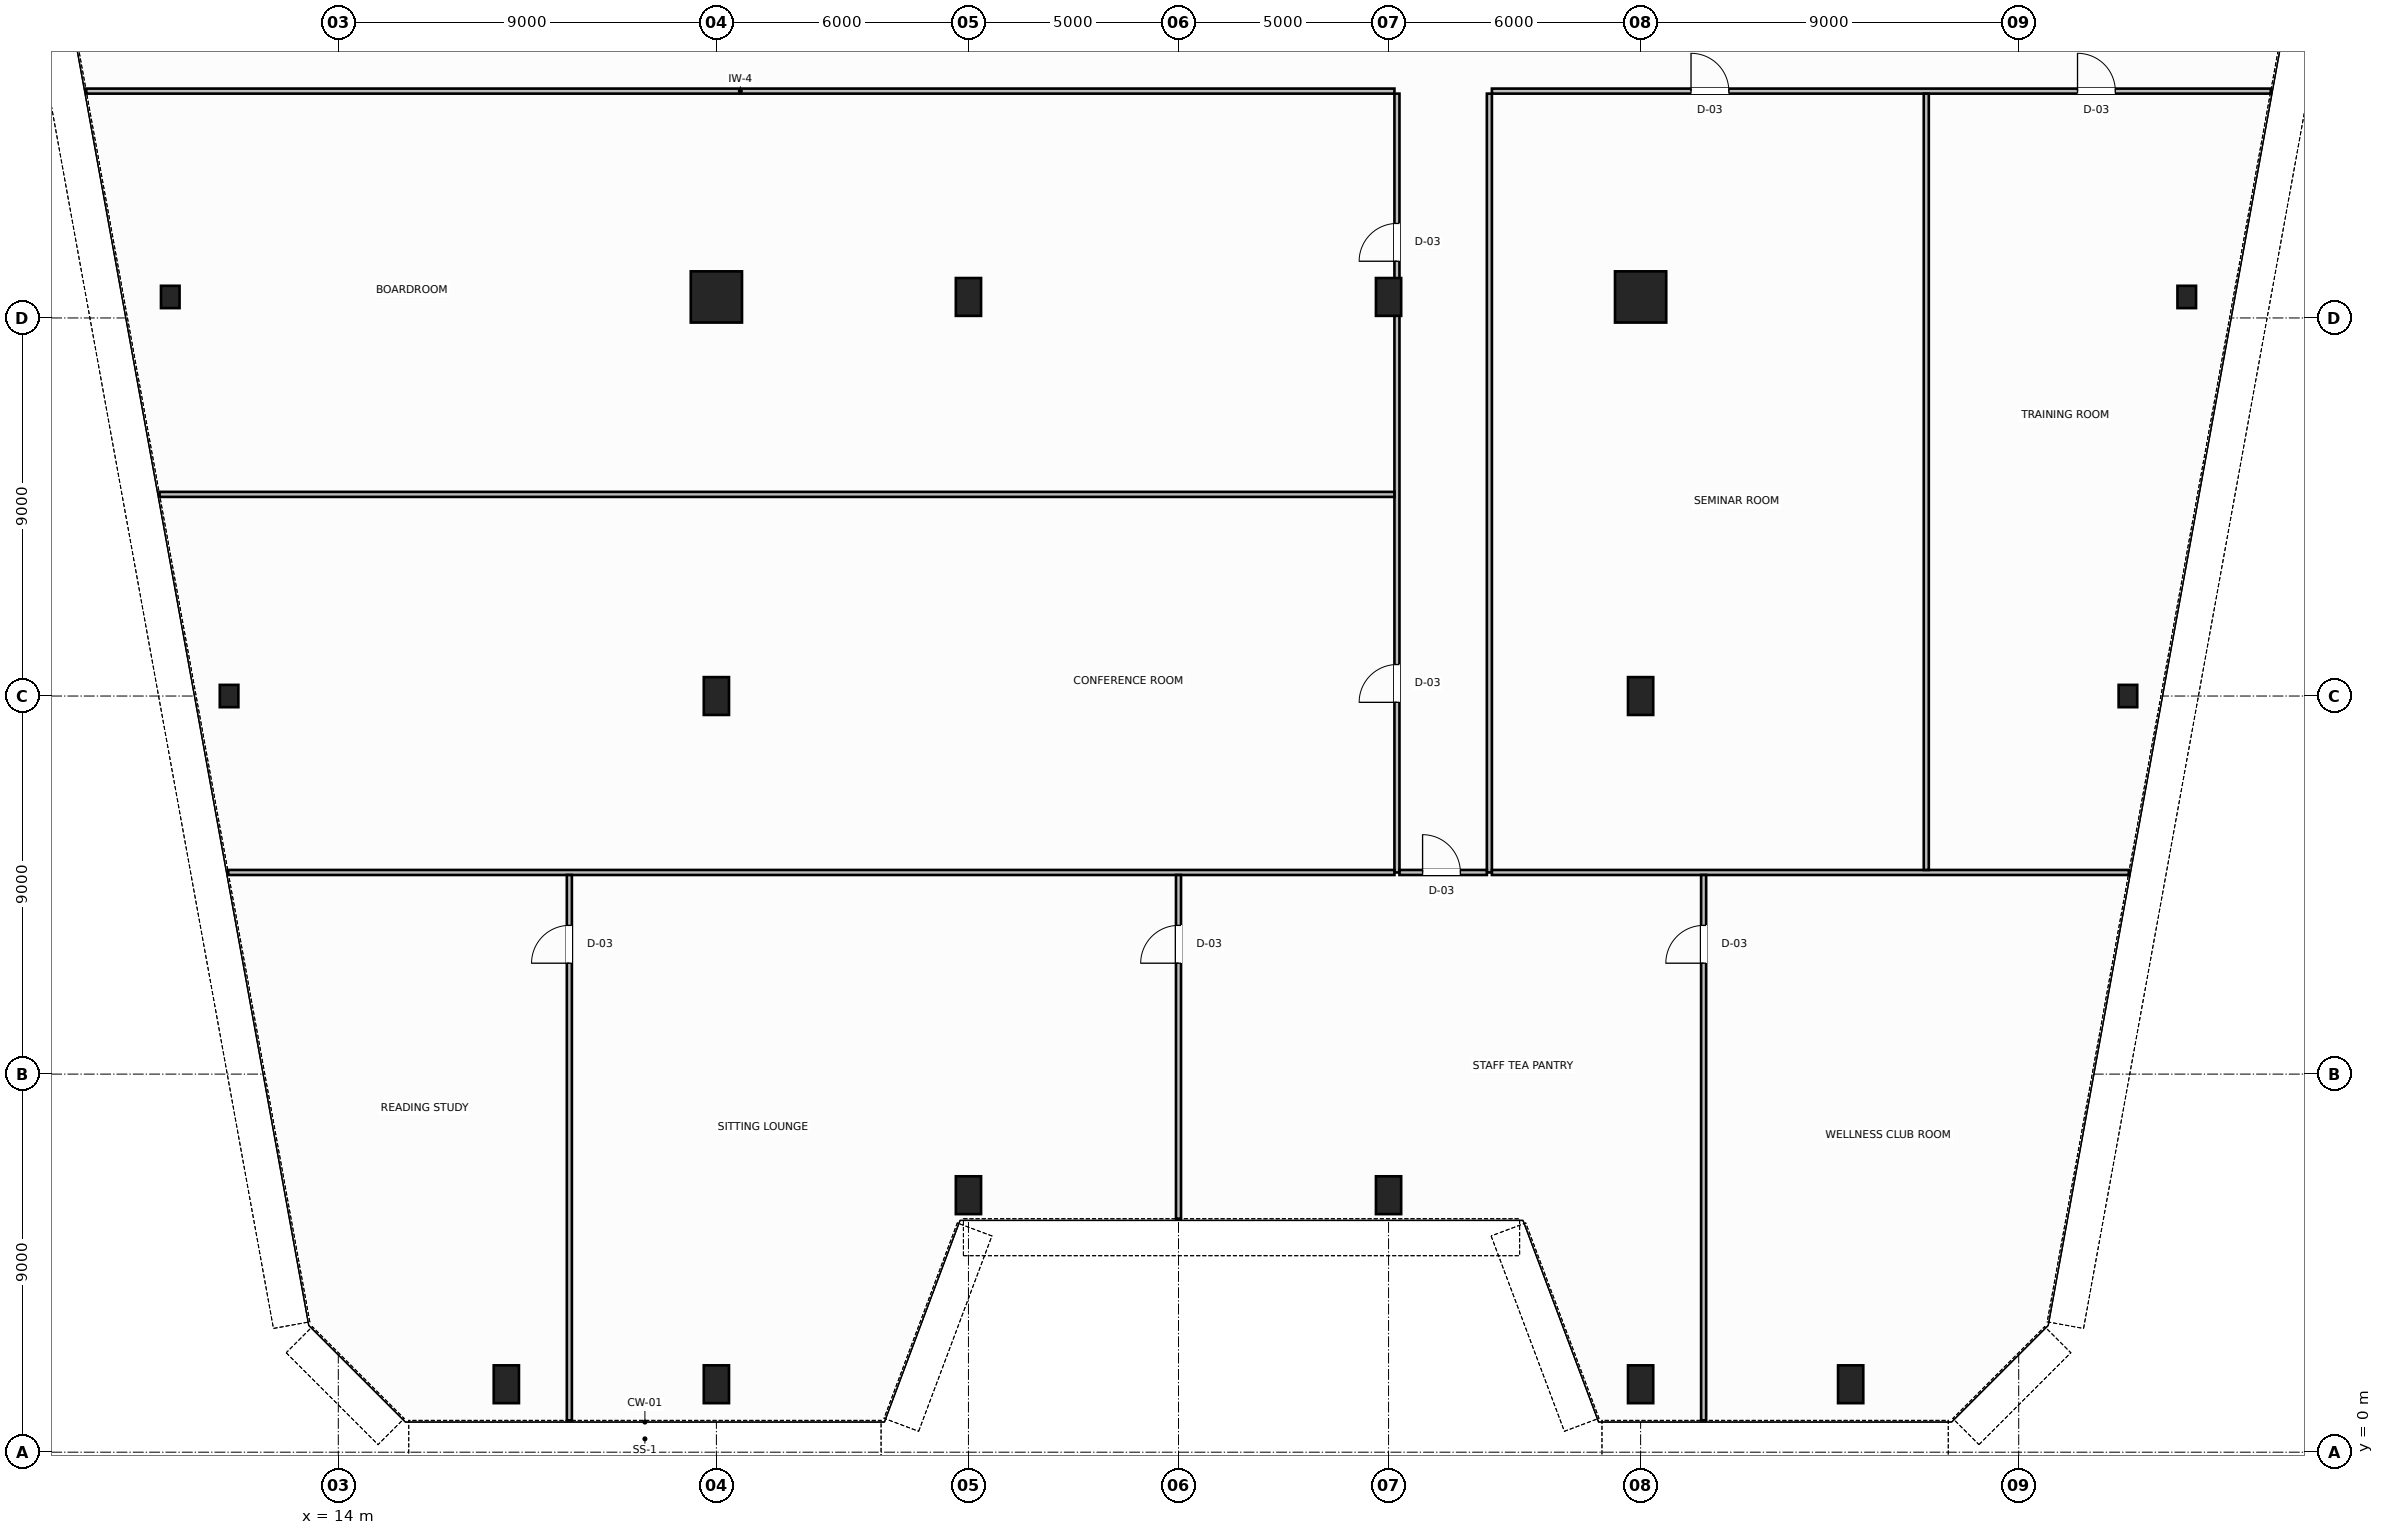
"""IFC4 building model, lengths in metres.
Left out: names, types, materials, properties, quantities, classifications, styles, units other than length and angle.
Written with IfcOpenShell. Run it as: python <this file> out.ifc"""

import sys

from ifc_helpers import new_model, si_unit, direction, frame, frame_2d, origin, origin_2d, place, context, subcontext, project, spatial, rectangle, hollow_rectangle, hollow_circle, i_section, extrude, source, transform, mapped, element, fill, save


model = new_model("IFC4")
c1 = context("Model", 3, precision=1e-05, world=origin(), true_north=direction((0.0, 1.0)))
c2 = subcontext(c1, "Body", "Model", "MODEL_VIEW")
j1 = project(units=[si_unit("LENGTHUNIT", "METRE"), si_unit("PLANEANGLEUNIT", "RADIAN")], contexts=[c1])
p1 = place(None, origin())
s1 = spatial("IfcSite", under=j1, at=p1, CompositionType="ELEMENT")
p2 = place(p1, origin())
s2 = spatial("IfcBuilding", under=s1, at=p2, CompositionType="ELEMENT")
p3 = place(p2, frame((0.0, 0.0, 30.2)))
s3 = spatial("IfcBuildingStorey", under=s2, at=p3, CompositionType="ELEMENT", Elevation=30.2)
m1 = source(origin(), c2, "Body", "SweptSolid", [
    extrude(i_section(OverallWidth=0.442, OverallDepth=0.531, WebThickness=0.065, FlangeThickness=0.076, FilletRadius=0.015, at=origin_2d()), origin(), (0.0, 0.0, 1.0), 3.8),
])
for number, where, z_axis, x_axis in (
    (1, (10.0, 27.5, 0.0), (0.0, 0.0, 1.0), (1.0, 0.0, 0.0)),
    (2, (11.4, 18.0, 0.0), (0.0, 0.0, 1.0), (1.0, 0.0, 0.0)),
    (3, (58.0, 27.5, 0.0), (0.0, 0.0, 1.0), (1.0, 0.0, 0.0)),
    (4, (56.6, 18.0, 0.0), (0.0, 0.0, 1.0), (1.0, 0.0, 0.0)),
):
    element("IfcColumn", number, at=place(p3, frame(where, z_axis=z_axis, x_axis=x_axis)), inside=s3, PredefinedType="COLUMN", context=c2, shape_type="MappedRepresentation", body=[
        mapped(m1, transform((0.0, 0.0, 0.0), scale=1.0)),
    ])
m2 = source(origin(), c2, "Body", "SweptSolid", [
    extrude(hollow_circle(Radius=0.61, WallThickness=0.05, at=origin_2d()), origin(), (0.0, 0.0, 1.0), 3.8),
])
p4 = place(p3, frame((23.0, 27.5, 0.0), z_axis=(0.0, 0.0, 1.0), x_axis=(1.0, 0.0, 0.0)))
e5 = element("IfcColumn", 5, at=p4, inside=s3, PredefinedType="COLUMN", context=c2, shape_type="MappedRepresentation", body=[
    mapped(m2, transform((0.0, 0.0, 0.0), scale=1.0)),
])
m3 = source(origin(), c2, "Body", "SweptSolid", [
    extrude(hollow_rectangle(XDim=0.6, YDim=0.9, WallThickness=0.04, InnerFilletRadius=0.04, OuterFilletRadius=0.08, at=origin_2d()), origin(), (0.0, 0.0, 1.0), 3.8),
])
for number, where, z_axis, x_axis in (
    (6, (29.0, 27.5, 0.0), (0.0, 0.0, 1.0), (1.0, 0.0, 0.0)),
    (7, (39.0, 27.5, 0.0), (0.0, 0.0, 1.0), (1.0, 0.0, 0.0)),
):
    element("IfcColumn", number, at=place(p3, frame(where, z_axis=z_axis, x_axis=x_axis)), inside=s3, PredefinedType="COLUMN", context=c2, shape_type="MappedRepresentation", body=[
        mapped(m3, transform((0.0, 0.0, 0.0), scale=1.0)),
    ])
p5 = place(p3, frame((45.0, 27.5, 0.0), z_axis=(0.0, 0.0, 1.0), x_axis=(1.0, 0.0, 0.0)))
e8 = element("IfcColumn", 8, at=p5, inside=s3, PredefinedType="COLUMN", context=c2, shape_type="MappedRepresentation", body=[
    mapped(m2, transform((0.0, 0.0, 0.0), scale=1.0)),
])
for number, where, z_axis, x_axis in (
    (9, (23.0, 18.0, 0.0), (0.0, 0.0, 1.0), (1.0, 0.0, 0.0)),
    (10, (45.0, 18.0, 0.0), (0.0, 0.0, 1.0), (1.0, 0.0, 0.0)),
):
    element("IfcColumn", number, at=place(p3, frame(where, z_axis=z_axis, x_axis=x_axis)), inside=s3, PredefinedType="COLUMN", context=c2, shape_type="MappedRepresentation", body=[
        mapped(m3, transform((0.0, 0.0, 0.0), scale=1.0)),
    ])
m4 = source(origin(), c2, "Body", "SweptSolid", [
    extrude(hollow_rectangle(XDim=0.6, YDim=0.9, WallThickness=0.04, InnerFilletRadius=0.04, OuterFilletRadius=0.08, at=origin_2d()), origin(), (0.0, 0.0, 1.0), 3.744),
])
for number, where, z_axis, x_axis in (
    (11, (18.0, 1.617, 0.032), (0.0, 0.064, 0.998), (-1.0, 0.0, 0.0)),
    (12, (23.0, 1.617, 0.032), (0.0, 0.064, 0.998), (-1.0, 0.0, 0.0)),
    (13, (29.0, 6.117, 0.032), (0.0, 0.064, 0.998), (-1.0, 0.0, 0.0)),
    (14, (39.0, 6.117, 0.032), (0.0, 0.064, 0.998), (-1.0, 0.0, 0.0)),
    (15, (45.0, 1.617, 0.032), (0.0, 0.064, 0.998), (-1.0, 0.0, 0.0)),
    (16, (50.0, 1.617, 0.032), (0.0, 0.064, 0.998), (-1.0, 0.0, 0.0)),
):
    element("IfcColumn", number, at=place(p3, frame(where, z_axis=z_axis, x_axis=x_axis)), inside=s3, PredefinedType="COLUMN", context=c2, shape_type="MappedRepresentation", body=[
        mapped(m4, transform((0.0, 0.0, 0.0), scale=1.0)),
    ])
p6 = place(p3, frame((8.0, 32.4, 0.0), z_axis=(0.0, 0.0, 1.0), x_axis=(1.0, 0.0, 0.0)))
e17 = element("IfcWall", 17, at=p6, inside=s3, PredefinedType="PARTITIONING", context=c2, shape_type="SweptSolid", body=[
    extrude(rectangle(XDim=31.14, YDim=0.12, at=frame_2d((15.57, 0.0))), origin(), (0.0, 0.0, 1.0), 3.58),
])
p7 = place(p3, frame((41.46, 32.4, 0.0), z_axis=(0.0, 0.0, 1.0), x_axis=(1.0, 0.0, 0.0)))
e18 = element("IfcWall", 18, at=p7, inside=s3, PredefinedType="PARTITIONING", context=c2, shape_type="SweptSolid", body=[
    extrude(rectangle(XDim=18.54, YDim=0.12, at=frame_2d((9.27, 0.0))), origin(), (0.0, 0.0, 1.0), 3.58),
])
p8 = place(p7, frame((4.74, 0.0, 0.0)))
e19 = element("IfcOpeningElement", 19, at=p8, cuts=e18, PredefinedType="OPENING", context=c2, shape_type="SweptSolid", body=[
    extrude(rectangle(XDim=0.9, YDim=2.15, at=frame_2d((0.45, 1.075))), frame((0.0, 0.07, 0.0), z_axis=(0.0, -1.0, 0.0), x_axis=(1.0, 0.0, 0.0)), (0.0, 0.0, 1.0), 0.14),
])
p9 = place(p7, frame((13.94, 0.0, 0.0)))
e20 = element("IfcOpeningElement", 20, at=p9, cuts=e18, PredefinedType="OPENING", context=c2, shape_type="SweptSolid", body=[
    extrude(rectangle(XDim=0.9, YDim=2.15, at=frame_2d((0.45, 1.075))), frame((0.0, 0.07, 0.0), z_axis=(0.0, -1.0, 0.0), x_axis=(1.0, 0.0, 0.0)), (0.0, 0.0, 1.0), 0.14),
])
p10 = place(p3, frame((39.2, 13.8, 0.0), z_axis=(0.0, 0.0, 1.0), x_axis=(0.0, 1.0, 0.0)))
e21 = element("IfcWall", 21, at=p10, inside=s3, PredefinedType="PARTITIONING", context=c2, shape_type="SweptSolid", body=[
    extrude(rectangle(XDim=18.54, YDim=0.12, at=frame_2d((9.27, 0.0))), origin(), (0.0, 0.0, 1.0), 2.77),
])
p11 = place(p10, frame((4.05, 0.0, 0.0)))
e22 = element("IfcOpeningElement", 22, at=p11, cuts=e21, PredefinedType="OPENING", context=c2, shape_type="SweptSolid", body=[
    extrude(rectangle(XDim=0.9, YDim=2.15, at=frame_2d((0.45, 1.075))), frame((0.0, 0.07, 0.0), z_axis=(0.0, -1.0, 0.0), x_axis=(1.0, 0.0, 0.0)), (0.0, 0.0, 1.0), 0.14),
])
p12 = place(p10, frame((14.55, 0.0, 0.0)))
e23 = element("IfcOpeningElement", 23, at=p12, cuts=e21, PredefinedType="OPENING", context=c2, shape_type="SweptSolid", body=[
    extrude(rectangle(XDim=0.9, YDim=2.15, at=frame_2d((0.45, 1.075))), frame((0.0, 0.07, 0.0), z_axis=(0.0, -1.0, 0.0), x_axis=(1.0, 0.0, 0.0)), (0.0, 0.0, 1.0), 0.14),
])
p13 = place(p3, frame((41.4, 13.8, 0.0), z_axis=(0.0, 0.0, 1.0), x_axis=(0.0, 1.0, 0.0)))
e24 = element("IfcWall", 24, at=p13, inside=s3, PredefinedType="PARTITIONING", context=c2, shape_type="SweptSolid", body=[
    extrude(rectangle(XDim=18.54, YDim=0.12, at=frame_2d((9.27, 0.0))), origin(), (0.0, 0.0, 1.0), 3.58),
])
p14 = place(p3, frame((39.26, 13.8, 0.0), z_axis=(0.0, 0.0, 1.0), x_axis=(1.0, 0.0, 0.0)))
e25 = element("IfcWall", 25, at=p14, inside=s3, PredefinedType="PARTITIONING", context=c2, shape_type="SweptSolid", body=[
    extrude(rectangle(XDim=2.08, YDim=0.12, at=frame_2d((1.04, 0.0))), origin(), (0.0, 0.0, 1.0), 3.58),
])
p15 = place(p14, frame((0.55, 0.0, 0.0)))
e26 = element("IfcOpeningElement", 26, at=p15, cuts=e25, PredefinedType="OPENING", context=c2, shape_type="SweptSolid", body=[
    extrude(rectangle(XDim=0.9, YDim=2.15, at=frame_2d((0.45, 1.075))), frame((0.0, 0.07, 0.0), z_axis=(0.0, -1.0, 0.0), x_axis=(1.0, 0.0, 0.0)), (0.0, 0.0, 1.0), 0.14),
])
p16 = place(p3, frame((11.378, 13.8, 0.0), z_axis=(0.0, 0.0, 1.0), x_axis=(1.0, 0.0, 0.0)))
e27 = element("IfcWall", 27, at=p16, inside=s3, PredefinedType="PARTITIONING", context=c2, shape_type="SweptSolid", body=[
    extrude(rectangle(XDim=27.761, YDim=0.12, at=frame_2d((13.881, 0.0))), origin(), (0.0, 0.0, 1.0), 3.58),
])
p17 = place(p3, frame((41.46, 13.8, 0.0), z_axis=(0.0, 0.0, 1.0), x_axis=(1.0, 0.0, 0.0)))
e28 = element("IfcWall", 28, at=p17, inside=s3, PredefinedType="PARTITIONING", context=c2, shape_type="SweptSolid", body=[
    extrude(rectangle(XDim=15.162, YDim=0.12, at=frame_2d((7.581, 0.0))), origin(), (0.0, 0.0, 1.0), 3.58),
])
p18 = place(p3, frame((19.5, 0.757, 0.0), z_axis=(0.0, 0.0, 1.0), x_axis=(0.0, 1.0, 0.0)))
e29 = element("IfcWall", 29, at=p18, inside=s3, PredefinedType="PARTITIONING", context=c2, shape_type="SweptSolid", body=[
    extrude(rectangle(XDim=12.983, YDim=0.12, at=frame_2d((6.491, 0.0))), origin(), (0.0, 0.0, 1.0), 3.58),
])
p19 = place(p18, frame((10.883, 0.0, 0.0)))
e30 = element("IfcOpeningElement", 30, at=p19, cuts=e29, PredefinedType="OPENING", context=c2, shape_type="SweptSolid", body=[
    extrude(rectangle(XDim=0.9, YDim=2.15, at=frame_2d((0.45, 1.075))), frame((0.0, 0.07, 0.0), z_axis=(0.0, -1.0, 0.0), x_axis=(1.0, 0.0, 0.0)), (0.0, 0.0, 1.0), 0.14),
])
p20 = place(p3, frame((34.0, 5.557, 0.0), z_axis=(0.0, 0.0, 1.0), x_axis=(0.0, 1.0, 0.0)))
e31 = element("IfcWall", 31, at=p20, inside=s3, PredefinedType="PARTITIONING", context=c2, shape_type="SweptSolid", body=[
    extrude(rectangle(XDim=8.183, YDim=0.12, at=frame_2d((4.091, 0.0))), origin(), (0.0, 0.0, 1.0), 3.58),
])
p21 = place(p20, frame((6.083, 0.0, 0.0)))
e32 = element("IfcOpeningElement", 32, at=p21, cuts=e31, PredefinedType="OPENING", context=c2, shape_type="SweptSolid", body=[
    extrude(rectangle(XDim=0.9, YDim=2.15, at=frame_2d((0.45, 1.075))), frame((0.0, 0.07, 0.0), z_axis=(0.0, -1.0, 0.0), x_axis=(1.0, 0.0, 0.0)), (0.0, 0.0, 1.0), 0.14),
])
p22 = place(p3, frame((46.5, 0.757, 0.0), z_axis=(0.0, 0.0, 1.0), x_axis=(0.0, 1.0, 0.0)))
e33 = element("IfcWall", 33, at=p22, inside=s3, PredefinedType="PARTITIONING", context=c2, shape_type="SweptSolid", body=[
    extrude(rectangle(XDim=12.983, YDim=0.12, at=frame_2d((6.491, 0.0))), origin(), (0.0, 0.0, 1.0), 3.58),
])
p23 = place(p22, frame((10.883, 0.0, 0.0)))
e34 = element("IfcOpeningElement", 34, at=p23, cuts=e33, PredefinedType="OPENING", context=c2, shape_type="SweptSolid", body=[
    extrude(rectangle(XDim=0.9, YDim=2.15, at=frame_2d((0.45, 1.075))), frame((0.0, 0.07, 0.0), z_axis=(0.0, -1.0, 0.0), x_axis=(1.0, 0.0, 0.0)), (0.0, 0.0, 1.0), 0.14),
])
p24 = place(p3, frame((9.744, 22.8, 0.0), z_axis=(0.0, 0.0, 1.0), x_axis=(1.0, 0.0, 0.0)))
e35 = element("IfcWall", 35, at=p24, inside=s3, PredefinedType="PARTITIONING", context=c2, shape_type="SweptSolid", body=[
    extrude(rectangle(XDim=29.396, YDim=0.12, at=frame_2d((14.698, 0.0))), origin(), (0.0, 0.0, 1.0), 3.58),
])
p25 = place(p3, frame((51.8, 13.86, 0.0), z_axis=(0.0, 0.0, 1.0), x_axis=(0.0, 1.0, 0.0)))
e36 = element("IfcWall", 36, at=p25, inside=s3, PredefinedType="PARTITIONING", context=c2, shape_type="SweptSolid", body=[
    extrude(rectangle(XDim=18.48, YDim=0.12, at=frame_2d((9.24, 0.0))), origin(), (0.0, 0.0, 1.0), 3.58),
])
m5 = source(origin(), c2, "Body", "SweptSolid", [
    extrude(rectangle(XDim=0.9, YDim=2.15, at=frame_2d((0.45, 1.075))), frame((0.0, 0.025, 0.0), z_axis=(0.0, -1.0, 0.0), x_axis=(1.0, 0.0, 0.0)), (0.0, 0.0, 1.0), 0.05),
])
p26 = place(p19, origin())
e37 = element("IfcDoor", 37, at=p26, inside=s3, OperationType="SINGLE_SWING_RIGHT", PredefinedType="DOOR", context=c2, shape_type="MappedRepresentation", body=[
    mapped(m5, transform((0.0, 0.0, 0.0), scale=1.0)),
])
fill(e30, e37)
p27 = place(p21, origin())
e38 = element("IfcDoor", 38, at=p27, inside=s3, OperationType="SINGLE_SWING_LEFT", PredefinedType="DOOR", context=c2, shape_type="MappedRepresentation", body=[
    mapped(m5, transform((0.0, 0.0, 0.0), scale=1.0)),
])
fill(e32, e38)
p28 = place(p15, origin())
e39 = element("IfcDoor", 39, at=p28, inside=s3, OperationType="SINGLE_SWING_LEFT", PredefinedType="DOOR", context=c2, shape_type="MappedRepresentation", body=[
    mapped(m5, transform((0.0, 0.0, 0.0), scale=1.0)),
])
fill(e26, e39)
p29 = place(p23, origin())
e40 = element("IfcDoor", 40, at=p29, inside=s3, OperationType="SINGLE_SWING_RIGHT", PredefinedType="DOOR", context=c2, shape_type="MappedRepresentation", body=[
    mapped(m5, transform((0.0, 0.0, 0.0), scale=1.0)),
])
fill(e34, e40)
p30 = place(p11, origin())
e41 = element("IfcDoor", 41, at=p30, inside=s3, OperationType="SINGLE_SWING_LEFT", PredefinedType="DOOR", context=c2, shape_type="MappedRepresentation", body=[
    mapped(m5, transform((0.0, 0.0, 0.0), scale=1.0)),
])
fill(e22, e41)
p31 = place(p12, origin())
e42 = element("IfcDoor", 42, at=p31, inside=s3, OperationType="SINGLE_SWING_RIGHT", PredefinedType="DOOR", context=c2, shape_type="MappedRepresentation", body=[
    mapped(m5, transform((0.0, 0.0, 0.0), scale=1.0)),
])
fill(e23, e42)
p32 = place(p8, origin())
e43 = element("IfcDoor", 43, at=p32, inside=s3, OperationType="SINGLE_SWING_RIGHT", PredefinedType="DOOR", context=c2, shape_type="MappedRepresentation", body=[
    mapped(m5, transform((0.0, 0.0, 0.0), scale=1.0)),
])
fill(e19, e43)
p33 = place(p9, origin())
e44 = element("IfcDoor", 44, at=p33, inside=s3, OperationType="SINGLE_SWING_LEFT", PredefinedType="DOOR", context=c2, shape_type="MappedRepresentation", body=[
    mapped(m5, transform((0.0, 0.0, 0.0), scale=1.0)),
])
fill(e20, e44)
save(model, sys.argv[1])
